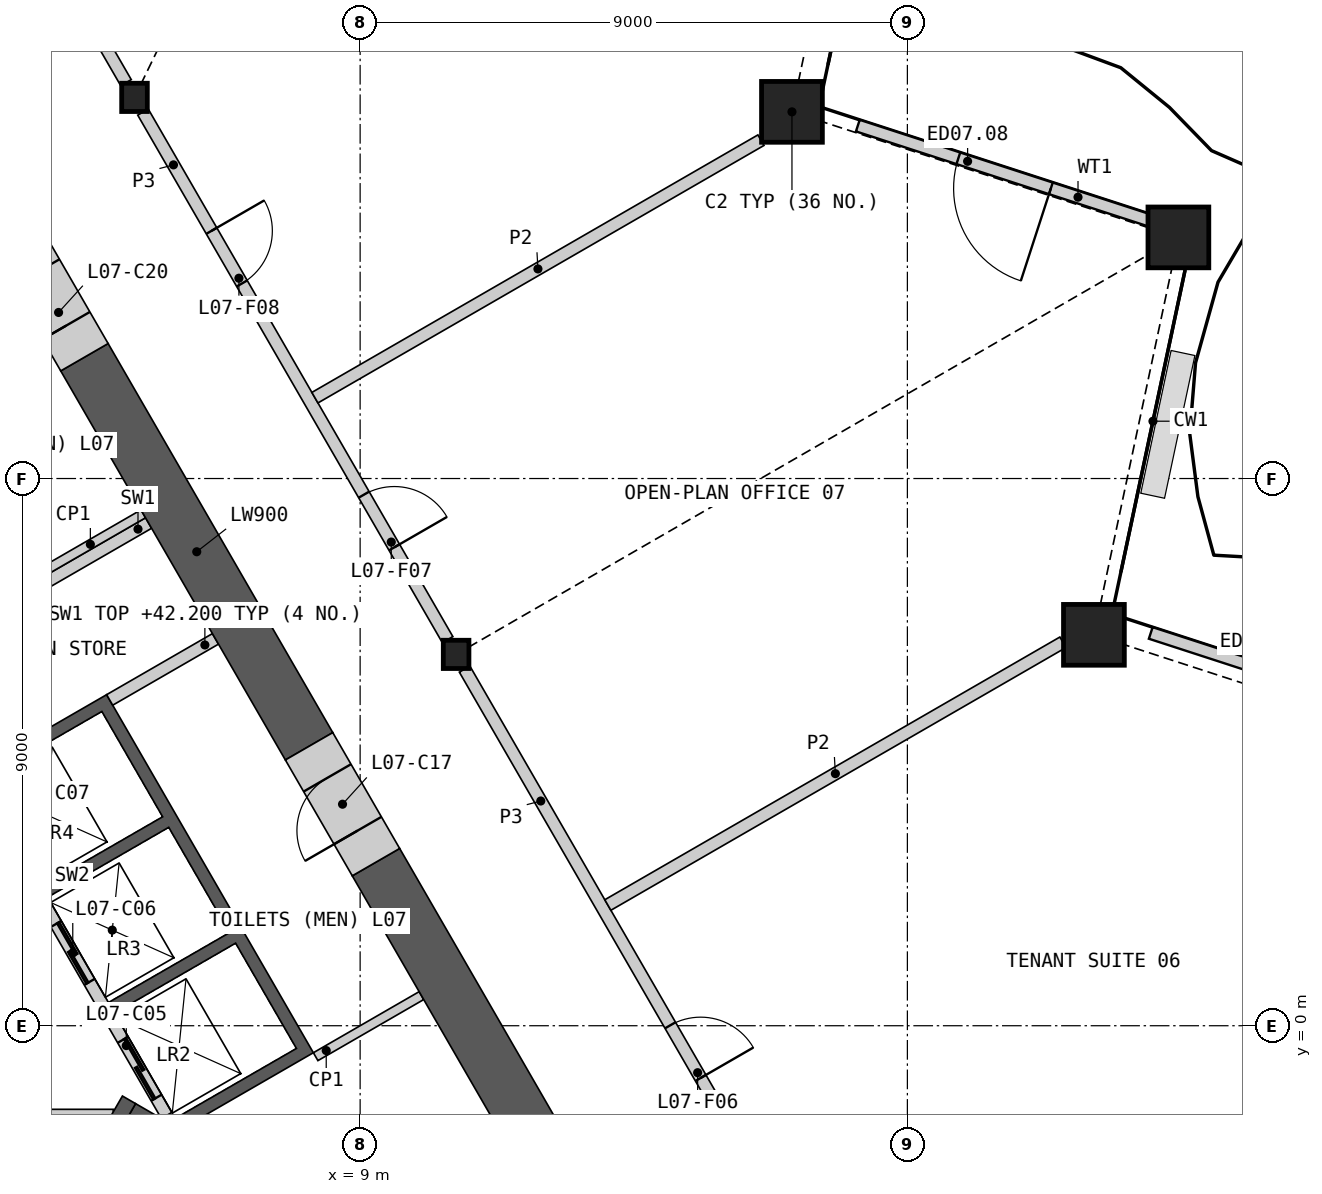
"""IFC4 building model, lengths in metres.
Left out: names, types, materials, properties, quantities, classifications, styles, units other than length and angle.
Written with IfcOpenShell. Run it as: python <this file> out.ifc"""

import sys

from ifc_helpers import new_model, si_unit, direction, frame, frame_2d, origin, origin_2d, place, context, subcontext, project, spatial, polyline, rectangle, hollow_rectangle, i_section, outline, extrude, element, fill, save


model = new_model("IFC4")
c1 = context("Model", 3, precision=1e-05, world=origin(), true_north=direction((0.0, 1.0)))
c2 = subcontext(c1, "Body", "Model", "MODEL_VIEW")
j1 = project(units=[si_unit("LENGTHUNIT", "METRE"), si_unit("PLANEANGLEUNIT", "RADIAN")], contexts=[c1])
p1 = place(None, origin())
s1 = spatial("IfcSite", under=j1, at=p1, CompositionType="ELEMENT")
p2 = place(p1, origin())
s2 = spatial("IfcBuilding", under=s1, at=p2, CompositionType="ELEMENT")
p3 = place(p2, frame((0.0, 0.0, 38.4)))
s3 = spatial("IfcBuildingStorey", under=s2, at=p3, CompositionType="ELEMENT", Elevation=38.4)
for number, where, z_axis, x_axis in (
    (1, (21.068, 6.429, 0.0), (0.0, 0.0, 1.0), (1.0, 0.0, 0.0)),
    (2, (22.457, 12.966, 0.0), (0.0, 0.0, 1.0), (1.0, 0.0, 0.0)),
    (3, (16.102, 15.031, 0.0), (0.0, 0.0, 1.0), (1.0, 0.0, 0.0)),
):
    element("IfcColumn", number, at=place(p3, frame(where, z_axis=z_axis, x_axis=x_axis)), inside=s3, PredefinedType="COLUMN", context=c2, shape_type="SweptSolid", body=[
        extrude(hollow_rectangle(XDim=1.0, YDim=1.0, WallThickness=0.07, at=origin_2d()), origin(), (0.0, 0.0, 1.0), 4.2),
    ])
for number, where, z_axis, x_axis in (
    (4, (10.578, 6.107, 0.0), (0.0, 0.0, 1.0), (1.0, 0.0, 0.0)),
    (5, (5.289, 15.269, 0.0), (0.0, 0.0, 1.0), (1.0, 0.0, 0.0)),
):
    element("IfcColumn", number, at=place(p3, frame(where, z_axis=z_axis, x_axis=x_axis)), inside=s3, PredefinedType="COLUMN", context=c2, shape_type="SweptSolid", body=[
        extrude(i_section(OverallWidth=0.421, OverallDepth=0.465, WebThickness=0.045, FlangeThickness=0.072, at=origin_2d()), origin(), (0.0, 0.0, 1.0), 4.2),
    ])
p4 = place(p3, frame((26.923, 4.861, 0.0), z_axis=(0.0, 0.0, 1.0), x_axis=(-0.951053139094, 0.309027388138, 0.0)))
e6 = element("IfcWall", 6, at=p4, inside=s3, PredefinedType="SOLIDWALL", context=c2, shape_type="SweptSolid", body=[
    extrude(rectangle(XDim=5.174, YDim=0.2, at=frame_2d((2.587, 0.0))), origin(), (0.0, 0.0, 1.0), 3.189),
])
p5 = place(p4, frame((1.836, 0.0, 0.0)))
e7 = element("IfcOpeningElement", 7, at=p5, cuts=e6, PredefinedType="OPENING", context=c2, shape_type="SweptSolid", body=[
    extrude(rectangle(XDim=1.6, YDim=2.4, at=frame_2d((0.8, 1.2))), frame((0.0, 0.11, 0.0), z_axis=(0.0, -1.0, 0.0), x_axis=(1.0, 0.0, 0.0)), (0.0, 0.0, 1.0), 0.22),
])
p6 = place(p3, frame((22.013, 13.235, 0.0), z_axis=(0.0, 0.0, 1.0), x_axis=(-0.951051031059, 0.309033875687, 0.0)))
e8 = element("IfcWall", 8, at=p6, inside=s3, PredefinedType="SOLIDWALL", context=c2, shape_type="SweptSolid", body=[
    extrude(rectangle(XDim=5.077, YDim=0.2, at=frame_2d((2.538, 0.0))), origin(), (0.0, 0.0, 1.0), 3.189),
])
p7 = place(p6, frame((1.738, 0.0, 0.0)))
e9 = element("IfcOpeningElement", 9, at=p7, cuts=e8, PredefinedType="OPENING", context=c2, shape_type="SweptSolid", body=[
    extrude(rectangle(XDim=1.6, YDim=2.4, at=frame_2d((0.8, 1.2))), frame((0.0, 0.11, 0.0), z_axis=(0.0, -1.0, 0.0), x_axis=(1.0, 0.0, 0.0)), (0.0, 0.0, 1.0), 0.22),
])
p8 = place(p3, origin())
e10 = element("IfcWall", 10, at=p8, inside=s3, PredefinedType="SHEAR", context=c2, shape_type="SweptSolid", body=[
    extrude(outline(polyline([(2.66, 4.192), (4.831, 5.445), (8.231, -0.444), (6.061, -1.697), (5.96, -1.524), (7.952, -0.374), (6.952, 1.358), (4.96, 0.208), (4.861, 0.381), (6.852, 1.531), (5.852, 3.263), (3.861, 2.113), (3.76, 2.287), (5.752, 3.437), (4.752, 5.169), (2.76, 4.019), (2.66, 4.192)])), origin(), (0.0, 0.0, 1.0), 3.8),
])
p9 = place(p3, frame((5.817, -1.476, 0.0), z_axis=(0.0, 0.0, 1.0), x_axis=(-0.500002616675, 0.866023893041, 0.0)))
e11 = element("IfcWall", 11, at=p9, inside=s3, PredefinedType="SOLIDWALL", context=c2, shape_type="SweptSolid", body=[
    extrude(rectangle(XDim=8.373, YDim=0.2, at=frame_2d((4.187, 0.0))), origin(), (0.0, 0.0, 1.0), 3.8),
])
p10 = place(p9, frame((0.337, 0.0, 0.0)))
e12 = element("IfcOpeningElement", 12, at=p10, cuts=e11, PredefinedType="OPENING", context=c2, shape_type="SweptSolid", body=[
    extrude(rectangle(XDim=1.1, YDim=2.1, at=frame_2d((0.55, 1.05))), frame((0.0, 0.11, 0.0), z_axis=(0.0, -1.0, 0.0), x_axis=(1.0, 0.0, 0.0)), (0.0, 0.0, 1.0), 0.22),
])
p11 = place(p9, frame((2.537, 0.0, 0.0)))
e13 = element("IfcOpeningElement", 13, at=p11, cuts=e11, PredefinedType="OPENING", context=c2, shape_type="SweptSolid", body=[
    extrude(rectangle(XDim=1.1, YDim=2.1, at=frame_2d((0.55, 1.05))), frame((0.0, 0.11, 0.0), z_axis=(0.0, -1.0, 0.0), x_axis=(1.0, 0.0, 0.0)), (0.0, 0.0, 1.0), 0.22),
])
p12 = place(p9, frame((4.737, 0.0, 0.0)))
e14 = element("IfcOpeningElement", 14, at=p12, cuts=e11, PredefinedType="OPENING", context=c2, shape_type="SweptSolid", body=[
    extrude(rectangle(XDim=1.1, YDim=2.1, at=frame_2d((0.55, 1.05))), frame((0.0, 0.11, 0.0), z_axis=(0.0, -1.0, 0.0), x_axis=(1.0, 0.0, 0.0)), (0.0, 0.0, 1.0), 0.22),
])
p13 = place(p9, frame((7.037, 0.0, 0.0)))
e15 = element("IfcOpeningElement", 15, at=p13, cuts=e11, PredefinedType="OPENING", context=c2, shape_type="SweptSolid", body=[
    extrude(rectangle(XDim=0.9, YDim=2.1, at=frame_2d((0.45, 1.05))), frame((0.0, 0.11, 0.0), z_axis=(0.0, -1.0, 0.0), x_axis=(1.0, 0.0, 0.0)), (0.0, 0.0, 1.0), 0.22),
])
p14 = place(p3, frame((4.881, 5.358, 0.0), z_axis=(0.0, 0.0, 1.0), x_axis=(0.866035824272, 0.499981950752, 0.0)))
e16 = element("IfcWall", 16, at=p14, inside=s3, PredefinedType="SHEAR", context=c2, shape_type="SweptSolid", body=[
    extrude(rectangle(XDim=2.009, YDim=0.2, at=frame_2d((1.004, 0.0))), origin(), (0.0, 0.0, 1.0), 3.8),
])
p15 = place(p3, frame((3.781, 7.263, 0.0), z_axis=(0.0, 0.0, 1.0), x_axis=(0.865983199114, 0.50007309351, 0.0)))
e17 = element("IfcWall", 17, at=p15, inside=s3, PredefinedType="SHEAR", context=c2, shape_type="SweptSolid", body=[
    extrude(rectangle(XDim=2.009, YDim=0.2, at=frame_2d((1.004, 0.0))), origin(), (0.0, 0.0, 1.0), 3.8),
])
p16 = place(p3, frame((-4.941, -1.45, 0.0), z_axis=(0.0, 0.0, 1.0), x_axis=(1.0, 0.0, 0.0)))
e18 = element("IfcWall", 18, at=p16, inside=s3, PredefinedType="PARTITIONING", context=c2, shape_type="SweptSolid", body=[
    extrude(rectangle(XDim=9.882, YDim=0.15, at=frame_2d((4.941, 0.0))), origin(), (0.0, 0.0, 1.0), 3.8),
])
p17 = place(p16, frame((4.391, 0.0, 0.0)))
e19 = element("IfcOpeningElement", 19, at=p17, cuts=e18, PredefinedType="OPENING", context=c2, shape_type="SweptSolid", body=[
    extrude(rectangle(XDim=1.1, YDim=2.1, at=frame_2d((0.55, 1.05))), frame((0.0, 0.085, 0.0), z_axis=(0.0, -1.0, 0.0), x_axis=(1.0, 0.0, 0.0)), (0.0, 0.0, 1.0), 0.17),
])
p18 = place(p3, origin())
e20 = element("IfcWall", 20, at=p18, inside=s3, PredefinedType="SHEAR", context=c2, shape_type="SweptSolid", body=[
    extrude(outline(polyline([(10.032, -4.298), (10.374, -4.206), (5.307, -1.281), (5.182, -1.498), (10.032, -4.298)])), origin(), (0.0, 0.0, 1.0), 3.8),
])
p19 = place(p3, frame((3.655, -3.893, 0.0), z_axis=(0.0, 0.0, 1.0), x_axis=(0.499982516597, 0.866035497597, 0.0)))
e21 = element("IfcWall", 21, at=p19, inside=s3, PredefinedType="SHEAR", context=c2, shape_type="SweptSolid", body=[
    extrude(rectangle(XDim=3.088, YDim=0.25, at=frame_2d((1.544, 0.0))), origin(), (0.0, 0.0, 1.0), 3.8),
])
p20 = place(p19, frame((0.994, 0.0, 0.0)))
e22 = element("IfcOpeningElement", 22, at=p20, cuts=e21, PredefinedType="OPENING", context=c2, shape_type="SweptSolid", body=[
    extrude(rectangle(XDim=1.1, YDim=2.1, at=frame_2d((0.55, 1.05))), frame((0.0, 0.135, 0.0), z_axis=(0.0, -1.0, 0.0), x_axis=(1.0, 0.0, 0.0)), (0.0, 0.0, 1.0), 0.27),
])
for number, where, z_axis, x_axis in (
    (23, (3.693, 7.415, 0.0), (0.0, 0.0, 1.0), (0.866, 0.5, 0.0)),
    (24, (8.268, -0.509, 0.0), (0.0, 0.0, 1.0), (0.866, 0.5, 0.0)),
):
    element("IfcWall", number, at=place(p3, frame(where, z_axis=z_axis, x_axis=x_axis)), inside=s3, PredefinedType="PARTITIONING", context=c2, shape_type="SweptSolid", body=[
        extrude(rectangle(XDim=2.009, YDim=0.15, at=frame_2d((1.004, 0.0))), origin(), (0.0, 0.0, 1.0), 3.8),
    ])
p21 = place(p3, frame((15.831, -8.69, 0.0), z_axis=(0.0, 0.0, 1.0), x_axis=(-0.499997452939, 0.866026874326, 0.0)))
e25 = element("IfcWall", 25, at=p21, inside=s3, PredefinedType="SHEAR", context=c2, shape_type="SweptSolid", body=[
    extrude(rectangle(XDim=13.141, YDim=0.9, at=frame_2d((6.571, 0.0))), origin(), (0.0, 0.0, 1.0), 3.8),
])
p22 = place(p3, frame((8.16, 4.596, 0.0), z_axis=(0.0, 0.0, 1.0), x_axis=(-0.500012259336, 0.866018325738, 0.0)))
e26 = element("IfcWall", 26, at=p22, inside=s3, PredefinedType="SHEAR", context=c2, shape_type="SweptSolid", body=[
    extrude(rectangle(XDim=7.389, YDim=0.9, at=frame_2d((3.695, 0.0))), origin(), (0.0, 0.0, 1.0), 3.8),
])
p23 = place(p3, frame((9.26, 2.691, 0.0), z_axis=(0.0, 0.0, 1.0), x_axis=(-0.499946605688, 0.86605622881, 0.0)))
e27 = element("IfcWall", 27, at=p23, inside=s3, PredefinedType="SHEAR", context=c2, shape_type="SweptSolid", body=[
    extrude(rectangle(XDim=2.2, YDim=0.9, at=frame_2d((1.1, 0.0))), origin(), (0.0, 0.0, 1.0), 3.8),
])
p24 = place(p23, frame((0.6, 0.0, 0.0)))
e28 = element("IfcOpeningElement", 28, at=p24, cuts=e27, PredefinedType="OPENING", context=c2, shape_type="SweptSolid", body=[
    extrude(rectangle(XDim=1.0, YDim=2.1, at=frame_2d((0.5, 1.05))), frame((0.0, 0.46, 0.0), z_axis=(0.0, -1.0, 0.0), x_axis=(1.0, 0.0, 0.0)), (0.0, 0.0, 1.0), 0.92),
])
p25 = place(p3, frame((4.466, 10.995, 0.0), z_axis=(0.0, 0.0, 1.0), x_axis=(-0.500077893725, 0.86598042715, 0.0)))
e29 = element("IfcWall", 29, at=p25, inside=s3, PredefinedType="SHEAR", context=c2, shape_type="SweptSolid", body=[
    extrude(rectangle(XDim=2.2, YDim=0.9, at=frame_2d((1.1, 0.0))), origin(), (0.0, 0.0, 1.0), 3.8),
])
p26 = place(p25, frame((0.6, 0.0, 0.0)))
e30 = element("IfcOpeningElement", 30, at=p26, cuts=e29, PredefinedType="OPENING", context=c2, shape_type="SweptSolid", body=[
    extrude(rectangle(XDim=1.0, YDim=2.1, at=frame_2d((0.5, 1.05))), frame((0.0, 0.46, 0.0), z_axis=(0.0, -1.0, 0.0), x_axis=(1.0, 0.0, 0.0)), (0.0, 0.0, 1.0), 0.92),
])
p27 = place(p3, frame((5.429, 15.026, 0.0), z_axis=(0.0, 0.0, 1.0), x_axis=(0.50001002959, -0.86601961312, 0.0)))
e31 = element("IfcWall", 31, at=p27, inside=s3, PredefinedType="PARTITIONING", context=c2, shape_type="SweptSolid", body=[
    extrude(rectangle(XDim=10.019, YDim=0.2, at=frame_2d((5.009, 0.0))), origin(), (0.0, 0.0, 1.0), 3.8),
])
p28 = place(p27, frame((7.266, 0.0, 0.0)))
e32 = element("IfcOpeningElement", 32, at=p28, cuts=e31, PredefinedType="OPENING", context=c2, shape_type="SweptSolid", body=[
    extrude(rectangle(XDim=1.0, YDim=2.1, at=frame_2d((0.5, 1.05))), frame((0.0, 0.11, 0.0), z_axis=(0.0, -1.0, 0.0), x_axis=(1.0, 0.0, 0.0)), (0.0, 0.0, 1.0), 0.22),
])
p29 = place(p27, frame((2.254, 0.0, 0.0)))
e33 = element("IfcOpeningElement", 33, at=p29, cuts=e31, PredefinedType="OPENING", context=c2, shape_type="SweptSolid", body=[
    extrude(rectangle(XDim=1.0, YDim=2.1, at=frame_2d((0.5, 1.05))), frame((0.0, 0.11, 0.0), z_axis=(0.0, -1.0, 0.0), x_axis=(1.0, 0.0, 0.0)), (0.0, 0.0, 1.0), 0.22),
])
p30 = place(p3, frame((10.719, 5.865, 0.0), z_axis=(0.0, 0.0, 1.0), x_axis=(0.49999175339, -0.866030164915, 0.0)))
e34 = element("IfcWall", 34, at=p30, inside=s3, PredefinedType="PARTITIONING", context=c2, shape_type="SweptSolid", body=[
    extrude(rectangle(XDim=10.019, YDim=0.2, at=frame_2d((5.009, 0.0))), origin(), (0.0, 0.0, 1.0), 3.8),
])
p31 = place(p30, frame((6.764, 0.0, 0.0)))
e35 = element("IfcOpeningElement", 35, at=p31, cuts=e34, PredefinedType="OPENING", context=c2, shape_type="SweptSolid", body=[
    extrude(rectangle(XDim=1.0, YDim=2.1, at=frame_2d((0.5, 1.05))), frame((0.0, 0.11, 0.0), z_axis=(0.0, -1.0, 0.0), x_axis=(1.0, 0.0, 0.0)), (0.0, 0.0, 1.0), 0.22),
])
p32 = place(p3, frame((1.913, 21.116, 0.0), z_axis=(0.0, 0.0, 1.0), x_axis=(0.500001069878, -0.866024786089, 0.0)))
e36 = element("IfcWall", 36, at=p32, inside=s3, PredefinedType="PARTITIONING", context=c2, shape_type="SweptSolid", body=[
    extrude(rectangle(XDim=6.473, YDim=0.2, at=frame_2d((3.236, 0.0))), origin(), (0.0, 0.0, 1.0), 3.8),
])
p33 = place(p32, frame((0.96, 0.0, 0.0)))
e37 = element("IfcOpeningElement", 37, at=p33, cuts=e36, PredefinedType="OPENING", context=c2, shape_type="SweptSolid", body=[
    extrude(rectangle(XDim=1.0, YDim=2.1, at=frame_2d((0.5, 1.05))), frame((0.0, 0.11, 0.0), z_axis=(0.0, -1.0, 0.0), x_axis=(1.0, 0.0, 0.0)), (0.0, 0.0, 1.0), 0.22),
])
p34 = place(p3, frame((13.074, 1.985, 0.0), z_axis=(0.0, 0.0, 1.0), x_axis=(0.86602139752, 0.500006938989, 0.0)))
e38 = element("IfcWall", 38, at=p34, inside=s3, PredefinedType="PARTITIONING", context=c2, shape_type="SweptSolid", body=[
    extrude(rectangle(XDim=8.642, YDim=0.2, at=frame_2d((4.321, 0.0))), origin(), (0.0, 0.0, 1.0), 2.885),
])
p35 = place(p3, frame((8.256, 10.33, 0.0), z_axis=(0.0, 0.0, 1.0), x_axis=(0.866026229868, 0.499998569178, 0.0)))
e39 = element("IfcWall", 39, at=p35, inside=s3, PredefinedType="PARTITIONING", context=c2, shape_type="SweptSolid", body=[
    extrude(rectangle(XDim=8.47, YDim=0.2, at=frame_2d((4.235, 0.0))), origin(), (0.0, 0.0, 1.0), 2.885),
])
p36 = place(p7, origin())
e40 = element("IfcDoor", 40, at=p36, inside=s3, OperationType="DOUBLE_DOOR_SINGLE_SWING", PredefinedType="DOOR", context=c2, shape_type="SweptSolid", body=[
    extrude(rectangle(XDim=1.6, YDim=2.4, at=frame_2d((0.8, 1.2))), frame((0.0, 0.025, 0.0), z_axis=(0.0, -1.0, 0.0), x_axis=(1.0, 0.0, 0.0)), (0.0, 0.0, 1.0), 0.05),
])
fill(e9, e40)
p37 = place(p10, origin())
e41 = element("IfcDoor", 41, at=p37, inside=s3, OperationType="SLIDING_TO_LEFT", PredefinedType="DOOR", context=c2, shape_type="SweptSolid", body=[
    extrude(rectangle(XDim=1.1, YDim=2.1, at=frame_2d((0.55, 1.05))), frame((0.0, 0.025, 0.0), z_axis=(0.0, -1.0, 0.0), x_axis=(1.0, 0.0, 0.0)), (0.0, 0.0, 1.0), 0.05),
])
fill(e12, e41)
p38 = place(p11, origin())
e42 = element("IfcDoor", 42, at=p38, inside=s3, OperationType="SLIDING_TO_LEFT", PredefinedType="DOOR", context=c2, shape_type="SweptSolid", body=[
    extrude(rectangle(XDim=1.1, YDim=2.1, at=frame_2d((0.55, 1.05))), frame((0.0, 0.025, 0.0), z_axis=(0.0, -1.0, 0.0), x_axis=(1.0, 0.0, 0.0)), (0.0, 0.0, 1.0), 0.05),
])
fill(e13, e42)
p39 = place(p24, origin())
e43 = element("IfcDoor", 43, at=p39, inside=s3, OperationType="SINGLE_SWING_LEFT", PredefinedType="DOOR", context=c2, shape_type="SweptSolid", body=[
    extrude(rectangle(XDim=1.0, YDim=2.1, at=frame_2d((0.5, 1.05))), frame((0.0, 0.205, 0.0), z_axis=(0.0, -1.0, 0.0), x_axis=(1.0, 0.0, 0.0)), (0.0, 0.0, 1.0), 0.05),
])
fill(e28, e43)
p40 = place(p26, origin())
e44 = element("IfcDoor", 44, at=p40, inside=s3, OperationType="SINGLE_SWING_LEFT", PredefinedType="DOOR", context=c2, shape_type="SweptSolid", body=[
    extrude(rectangle(XDim=1.0, YDim=2.1, at=frame_2d((0.5, 1.05))), frame((0.0, 0.205, 0.0), z_axis=(0.0, -1.0, 0.0), x_axis=(1.0, 0.0, 0.0)), (0.0, 0.0, 1.0), 0.05),
])
fill(e30, e44)
p41 = place(p31, origin())
e45 = element("IfcDoor", 45, at=p41, inside=s3, OperationType="SINGLE_SWING_RIGHT", PredefinedType="DOOR", context=c2, shape_type="SweptSolid", body=[
    extrude(rectangle(XDim=1.0, YDim=2.1, at=frame_2d((0.5, 1.05))), frame((0.0, 0.025, 0.0), z_axis=(0.0, -1.0, 0.0), x_axis=(1.0, 0.0, 0.0)), (0.0, 0.0, 1.0), 0.05),
])
fill(e35, e45)
p42 = place(p28, origin())
e46 = element("IfcDoor", 46, at=p42, inside=s3, OperationType="SINGLE_SWING_RIGHT", PredefinedType="DOOR", context=c2, shape_type="SweptSolid", body=[
    extrude(rectangle(XDim=1.0, YDim=2.1, at=frame_2d((0.5, 1.05))), frame((0.0, 0.025, 0.0), z_axis=(0.0, -1.0, 0.0), x_axis=(1.0, 0.0, 0.0)), (0.0, 0.0, 1.0), 0.05),
])
fill(e32, e46)
p43 = place(p29, origin())
e47 = element("IfcDoor", 47, at=p43, inside=s3, OperationType="SINGLE_SWING_LEFT", PredefinedType="DOOR", context=c2, shape_type="SweptSolid", body=[
    extrude(rectangle(XDim=1.0, YDim=2.1, at=frame_2d((0.5, 1.05))), frame((0.0, 0.025, 0.0), z_axis=(0.0, -1.0, 0.0), x_axis=(1.0, 0.0, 0.0)), (0.0, 0.0, 1.0), 0.05),
])
fill(e33, e47)
save(model, sys.argv[1])
